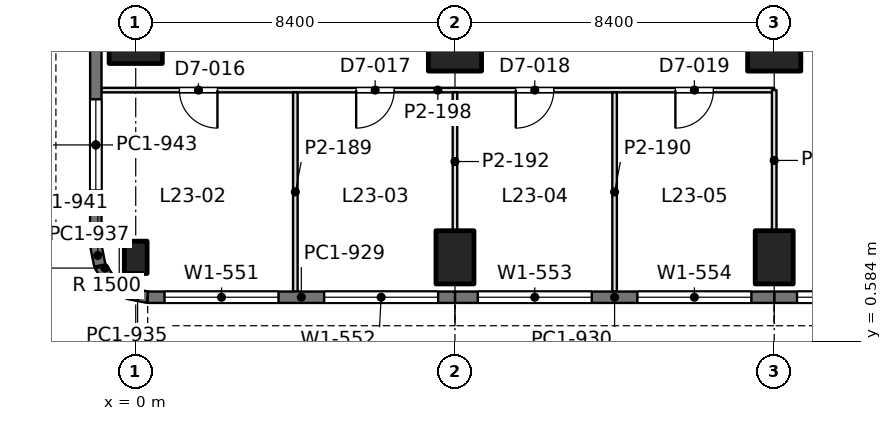
"""IFC4 building model, lengths in metres.
Left out: names, types, materials, properties, quantities, classifications, styles, units other than length and angle.
Written with IfcOpenShell. Run it as: python <this file> out.ifc"""

import sys

from ifc_helpers import new_model, si_unit, direction, frame, frame_2d, origin, origin_2d, place, context, subcontext, project, spatial, rectangle, extrude, element, fill, save


model = new_model("IFC4")
c1 = context("Model", 3, precision=1e-05, world=origin(), true_north=direction((0.0, 1.0)))
c2 = subcontext(c1, "Body", "Model", "MODEL_VIEW")
j1 = project(units=[si_unit("LENGTHUNIT", "METRE"), si_unit("PLANEANGLEUNIT", "RADIAN")], contexts=[c1])
p1 = place(None, origin())
s1 = spatial("IfcSite", under=j1, at=p1, CompositionType="ELEMENT")
p2 = place(p1, origin())
s2 = spatial("IfcBuilding", under=s1, at=p2, CompositionType="ELEMENT")
p3 = place(p2, frame((0.0, 0.0, 105.0)))
s3 = spatial("IfcBuildingStorey", under=s2, at=p3, CompositionType="ELEMENT", Elevation=105.0)
p4 = place(p3, frame((0.0, 2.8, 0.0), z_axis=(0.0, 0.0, 1.0), x_axis=(1.0, 0.0, 0.0)))
e1 = element("IfcColumn", 1, at=p4, inside=s3, PredefinedType="COLUMN", context=c2, shape_type="SweptSolid", body=[
    extrude(rectangle(XDim=0.6, YDim=0.85, at=origin_2d()), origin(), (0.0, 0.0, 1.0), 4.2),
])
for number, where, z_axis, x_axis in (
    (2, (0.0, 8.4, 0.0), (0.0, 0.0, 1.0), (0.0, 1.0, 0.0)),
    (3, (8.4, 2.8, 0.0), (0.0, 0.0, 1.0), (1.0, 0.0, 0.0)),
):
    element("IfcColumn", number, at=place(p3, frame(where, z_axis=z_axis, x_axis=x_axis)), inside=s3, PredefinedType="COLUMN", context=c2, shape_type="SweptSolid", body=[
        extrude(rectangle(XDim=1.0, YDim=1.4, at=origin_2d()), origin(), (0.0, 0.0, 1.0), 4.2),
    ])
p5 = place(p3, frame((8.4, 8.4, 0.0), z_axis=(0.0, 0.0, 1.0), x_axis=(1.0, 0.0, 0.0)))
e4 = element("IfcColumn", 4, at=p5, inside=s3, PredefinedType="COLUMN", context=c2, shape_type="SweptSolid", body=[
    extrude(rectangle(XDim=1.4, YDim=1.4, at=origin_2d()), origin(), (0.0, 0.0, 1.0), 4.2),
])
p6 = place(p3, frame((16.8, 2.8, 0.0), z_axis=(0.0, 0.0, 1.0), x_axis=(1.0, 0.0, 0.0)))
e5 = element("IfcColumn", 5, at=p6, inside=s3, PredefinedType="COLUMN", context=c2, shape_type="SweptSolid", body=[
    extrude(rectangle(XDim=1.0, YDim=1.4, at=origin_2d()), origin(), (0.0, 0.0, 1.0), 4.2),
])
p7 = place(p3, frame((16.8, 8.4, 0.0), z_axis=(0.0, 0.0, 1.0), x_axis=(1.0, 0.0, 0.0)))
e6 = element("IfcColumn", 6, at=p7, inside=s3, PredefinedType="COLUMN", context=c2, shape_type="SweptSolid", body=[
    extrude(rectangle(XDim=1.4, YDim=1.4, at=origin_2d()), origin(), (0.0, 0.0, 1.0), 4.2),
])
p8 = place(p3, frame((25.2, 1.75, 0.0), z_axis=(0.0, 0.0, 1.0), x_axis=(-1.0, 0.0, 0.0)))
e7 = element("IfcWall", 7, at=p8, inside=s3, PredefinedType="SOLIDWALL", context=c2, shape_type="SweptSolid", body=[
    extrude(rectangle(XDim=8.4, YDim=0.3, at=frame_2d((4.2, 0.0))), origin(), (0.0, 0.0, 1.0), 4.05),
])
p9 = place(p8, frame((0.6, 0.0, 0.9)))
e8 = element("IfcOpeningElement", 8, at=p9, cuts=e7, PredefinedType="OPENING", context=c2, shape_type="SweptSolid", body=[
    extrude(rectangle(XDim=3.0, YDim=1.9, at=frame_2d((1.5, 0.95))), frame((0.0, 0.16, 0.0), z_axis=(0.0, -1.0, 0.0), x_axis=(1.0, 0.0, 0.0)), (0.0, 0.0, 1.0), 0.32),
])
p10 = place(p8, frame((4.8, 0.0, 0.9)))
e9 = element("IfcOpeningElement", 9, at=p10, cuts=e7, PredefinedType="OPENING", context=c2, shape_type="SweptSolid", body=[
    extrude(rectangle(XDim=3.0, YDim=1.9, at=frame_2d((1.5, 0.95))), frame((0.0, 0.16, 0.0), z_axis=(0.0, -1.0, 0.0), x_axis=(1.0, 0.0, 0.0)), (0.0, 0.0, 1.0), 0.32),
])
p11 = place(p3, frame((16.8, 1.75, 0.0), z_axis=(0.0, 0.0, 1.0), x_axis=(-1.0, 0.0, 0.0)))
e10 = element("IfcWall", 10, at=p11, inside=s3, PredefinedType="SOLIDWALL", context=c2, shape_type="SweptSolid", body=[
    extrude(rectangle(XDim=8.4, YDim=0.3, at=frame_2d((4.2, 0.0))), origin(), (0.0, 0.0, 1.0), 4.05),
])
p12 = place(p11, frame((0.6, 0.0, 0.9)))
e11 = element("IfcOpeningElement", 11, at=p12, cuts=e10, PredefinedType="OPENING", context=c2, shape_type="SweptSolid", body=[
    extrude(rectangle(XDim=3.0, YDim=1.9, at=frame_2d((1.5, 0.95))), frame((0.0, 0.16, 0.0), z_axis=(0.0, -1.0, 0.0), x_axis=(1.0, 0.0, 0.0)), (0.0, 0.0, 1.0), 0.32),
])
p13 = place(p11, frame((4.8, 0.0, 0.9)))
e12 = element("IfcOpeningElement", 12, at=p13, cuts=e10, PredefinedType="OPENING", context=c2, shape_type="SweptSolid", body=[
    extrude(rectangle(XDim=3.0, YDim=1.9, at=frame_2d((1.5, 0.95))), frame((0.0, 0.16, 0.0), z_axis=(0.0, -1.0, 0.0), x_axis=(1.0, 0.0, 0.0)), (0.0, 0.0, 1.0), 0.32),
])
p14 = place(p3, frame((8.4, 1.75, 0.0), z_axis=(0.0, 0.0, 1.0), x_axis=(-1.0, 0.0, 0.0)))
e13 = element("IfcWall", 13, at=p14, inside=s3, PredefinedType="SOLIDWALL", context=c2, shape_type="SweptSolid", body=[
    extrude(rectangle(XDim=8.085, YDim=0.3, at=frame_2d((4.042, 0.0))), origin(), (0.0, 0.0, 1.0), 4.05),
])
p15 = place(p14, frame((0.443, 0.0, 0.9)))
e14 = element("IfcOpeningElement", 14, at=p15, cuts=e13, PredefinedType="OPENING", context=c2, shape_type="SweptSolid", body=[
    extrude(rectangle(XDim=3.0, YDim=1.9, at=frame_2d((1.5, 0.95))), frame((0.0, 0.16, 0.0), z_axis=(0.0, -1.0, 0.0), x_axis=(1.0, 0.0, 0.0)), (0.0, 0.0, 1.0), 0.32),
])
p16 = place(p14, frame((4.643, 0.0, 0.9)))
e15 = element("IfcOpeningElement", 15, at=p16, cuts=e13, PredefinedType="OPENING", context=c2, shape_type="SweptSolid", body=[
    extrude(rectangle(XDim=3.0, YDim=1.9, at=frame_2d((1.5, 0.95))), frame((0.0, 0.16, 0.0), z_axis=(0.0, -1.0, 0.0), x_axis=(1.0, 0.0, 0.0)), (0.0, 0.0, 1.0), 0.32),
])
p17 = place(p3, frame((0.315, 1.75, 0.0), z_axis=(0.0, 0.0, 1.0), x_axis=(-0.980788534345, 0.195073962632, 0.0)))
e16 = element("IfcWall", 16, at=p17, inside=s3, PredefinedType="SOLIDWALL", context=c2, shape_type="SweptSolid", body=[
    extrude(rectangle(XDim=0.541, YDim=0.3, at=frame_2d((0.271, 0.0))), origin(), (0.0, 0.0, 1.0), 4.05),
])
for number, where, z_axis, x_axis in (
    (17, (-0.216, 1.855, 0.0), (0.0, 0.0, 1.0), (-0.831, 0.556, 0.0)),
    (18, (-0.653, 2.147, 0.0), (0.0, 0.0, 1.0), (-0.556, 0.831, 0.0)),
):
    element("IfcWall", number, at=place(p3, frame(where, z_axis=z_axis, x_axis=x_axis)), inside=s3, PredefinedType="SOLIDWALL", context=c2, shape_type="SweptSolid", body=[
        extrude(rectangle(XDim=0.526, YDim=0.3, at=frame_2d((0.263, 0.0))), origin(), (0.0, 0.0, 1.0), 4.05),
    ])
p18 = place(p3, frame((-0.945, 2.584, 0.0), z_axis=(0.0, 0.0, 1.0), x_axis=(-0.195073962632, 0.980788534345, 0.0)))
e19 = element("IfcWall", 19, at=p18, inside=s3, PredefinedType="SOLIDWALL", context=c2, shape_type="SweptSolid", body=[
    extrude(rectangle(XDim=0.541, YDim=0.3, at=frame_2d((0.271, 0.0))), origin(), (0.0, 0.0, 1.0), 4.05),
])
p19 = place(p3, frame((-1.05, 3.115, 0.0), z_axis=(0.0, 0.0, 1.0), x_axis=(0.0, 1.0, 0.0)))
e20 = element("IfcWall", 20, at=p19, inside=s3, PredefinedType="SOLIDWALL", context=c2, shape_type="SweptSolid", body=[
    extrude(rectangle(XDim=5.285, YDim=0.3, at=frame_2d((2.643, 0.0))), origin(), (0.0, 0.0, 1.0), 4.05),
])
p20 = place(p19, frame((1.443, 0.0, 0.9)))
e21 = element("IfcOpeningElement", 21, at=p20, cuts=e20, PredefinedType="OPENING", context=c2, shape_type="SweptSolid", body=[
    extrude(rectangle(XDim=2.4, YDim=1.9, at=frame_2d((1.2, 0.95))), frame((0.0, 0.16, 0.0), z_axis=(0.0, -1.0, 0.0), x_axis=(1.0, 0.0, 0.0)), (0.0, 0.0, 1.0), 0.32),
])
p21 = place(p3, frame((-0.902, 7.2, 0.0), z_axis=(0.0, 0.0, 1.0), x_axis=(1.0, 0.0, 0.0)))
e22 = element("IfcWall", 22, at=p21, inside=s3, PredefinedType="PARTITIONING", context=c2, shape_type="SweptSolid", body=[
    extrude(rectangle(XDim=17.702, YDim=0.12, at=frame_2d((8.851, 0.0))), origin(), (0.0, 0.0, 1.0), 3.55),
])
p22 = place(p21, frame((2.052, 0.0, 0.0)))
e23 = element("IfcOpeningElement", 23, at=p22, cuts=e22, PredefinedType="OPENING", context=c2, shape_type="SweptSolid", body=[
    extrude(rectangle(XDim=1.0, YDim=2.4, at=frame_2d((0.5, 1.2))), frame((0.0, 0.07, 0.0), z_axis=(0.0, -1.0, 0.0), x_axis=(1.0, 0.0, 0.0)), (0.0, 0.0, 1.0), 0.14),
])
p23 = place(p21, frame((6.702, 0.0, 0.0)))
e24 = element("IfcOpeningElement", 24, at=p23, cuts=e22, PredefinedType="OPENING", context=c2, shape_type="SweptSolid", body=[
    extrude(rectangle(XDim=1.0, YDim=2.4, at=frame_2d((0.5, 1.2))), frame((0.0, 0.07, 0.0), z_axis=(0.0, -1.0, 0.0), x_axis=(1.0, 0.0, 0.0)), (0.0, 0.0, 1.0), 0.14),
])
p24 = place(p21, frame((10.902, 0.0, 0.0)))
e25 = element("IfcOpeningElement", 25, at=p24, cuts=e22, PredefinedType="OPENING", context=c2, shape_type="SweptSolid", body=[
    extrude(rectangle(XDim=1.0, YDim=2.4, at=frame_2d((0.5, 1.2))), frame((0.0, 0.07, 0.0), z_axis=(0.0, -1.0, 0.0), x_axis=(1.0, 0.0, 0.0)), (0.0, 0.0, 1.0), 0.14),
])
p25 = place(p21, frame((15.102, 0.0, 0.0)))
e26 = element("IfcOpeningElement", 26, at=p25, cuts=e22, PredefinedType="OPENING", context=c2, shape_type="SweptSolid", body=[
    extrude(rectangle(XDim=1.0, YDim=2.4, at=frame_2d((0.5, 1.2))), frame((0.0, 0.07, 0.0), z_axis=(0.0, -1.0, 0.0), x_axis=(1.0, 0.0, 0.0)), (0.0, 0.0, 1.0), 0.14),
])
p26 = place(p3, frame((4.2, 1.898, 0.0), z_axis=(0.0, 0.0, 1.0), x_axis=(0.0, 1.0, 0.0)))
e27 = element("IfcWall", 27, at=p26, inside=s3, PredefinedType="PARTITIONING", context=c2, shape_type="SweptSolid", body=[
    extrude(rectangle(XDim=5.244, YDim=0.12, at=frame_2d((2.622, 0.0))), origin(), (0.0, 0.0, 1.0), 3.56),
])
p27 = place(p3, frame((8.4, 3.499, 0.0), z_axis=(0.0, 0.0, 1.0), x_axis=(0.0, 1.0, 0.0)))
e28 = element("IfcWall", 28, at=p27, inside=s3, PredefinedType="PARTITIONING", context=c2, shape_type="SweptSolid", body=[
    extrude(rectangle(XDim=3.643, YDim=0.12, at=frame_2d((1.822, 0.0))), origin(), (0.0, 0.0, 1.0), 3.55),
])
p28 = place(p3, frame((12.6, 1.898, 0.0), z_axis=(0.0, 0.0, 1.0), x_axis=(0.0, 1.0, 0.0)))
e29 = element("IfcWall", 29, at=p28, inside=s3, PredefinedType="PARTITIONING", context=c2, shape_type="SweptSolid", body=[
    extrude(rectangle(XDim=5.244, YDim=0.12, at=frame_2d((2.622, 0.0))), origin(), (0.0, 0.0, 1.0), 3.56),
])
p29 = place(p3, frame((16.8, 3.499, 0.0), z_axis=(0.0, 0.0, 1.0), x_axis=(0.0, 1.0, 0.0)))
e30 = element("IfcWall", 30, at=p29, inside=s3, PredefinedType="PARTITIONING", context=c2, shape_type="SweptSolid", body=[
    extrude(rectangle(XDim=3.701, YDim=0.12, at=frame_2d((1.851, 0.0))), origin(), (0.0, 0.0, 1.0), 3.55),
])
p30 = place(p10, origin())
e31 = element("IfcWindow", 31, at=p30, inside=s3, PartitioningType="SINGLE_PANEL", PredefinedType="WINDOW", context=c2, shape_type="SweptSolid", body=[
    extrude(rectangle(XDim=3.0, YDim=1.9, at=frame_2d((1.5, 0.95))), frame((0.0, 0.03, 0.0), z_axis=(0.0, -1.0, 0.0), x_axis=(1.0, 0.0, 0.0)), (0.0, 0.0, 1.0), 0.06),
])
fill(e9, e31)
p31 = place(p12, origin())
e32 = element("IfcWindow", 32, at=p31, inside=s3, PartitioningType="SINGLE_PANEL", PredefinedType="WINDOW", context=c2, shape_type="SweptSolid", body=[
    extrude(rectangle(XDim=3.0, YDim=1.9, at=frame_2d((1.5, 0.95))), frame((0.0, 0.03, 0.0), z_axis=(0.0, -1.0, 0.0), x_axis=(1.0, 0.0, 0.0)), (0.0, 0.0, 1.0), 0.06),
])
fill(e11, e32)
p32 = place(p13, origin())
e33 = element("IfcWindow", 33, at=p32, inside=s3, PartitioningType="SINGLE_PANEL", PredefinedType="WINDOW", context=c2, shape_type="SweptSolid", body=[
    extrude(rectangle(XDim=3.0, YDim=1.9, at=frame_2d((1.5, 0.95))), frame((0.0, 0.03, 0.0), z_axis=(0.0, -1.0, 0.0), x_axis=(1.0, 0.0, 0.0)), (0.0, 0.0, 1.0), 0.06),
])
fill(e12, e33)
p33 = place(p15, origin())
e34 = element("IfcWindow", 34, at=p33, inside=s3, PartitioningType="SINGLE_PANEL", PredefinedType="WINDOW", context=c2, shape_type="SweptSolid", body=[
    extrude(rectangle(XDim=3.0, YDim=1.9, at=frame_2d((1.5, 0.95))), frame((0.0, 0.03, 0.0), z_axis=(0.0, -1.0, 0.0), x_axis=(1.0, 0.0, 0.0)), (0.0, 0.0, 1.0), 0.06),
])
fill(e14, e34)
p34 = place(p16, origin())
e35 = element("IfcWindow", 35, at=p34, inside=s3, PartitioningType="SINGLE_PANEL", PredefinedType="WINDOW", context=c2, shape_type="SweptSolid", body=[
    extrude(rectangle(XDim=3.0, YDim=1.9, at=frame_2d((1.5, 0.95))), frame((0.0, 0.03, 0.0), z_axis=(0.0, -1.0, 0.0), x_axis=(1.0, 0.0, 0.0)), (0.0, 0.0, 1.0), 0.06),
])
fill(e15, e35)
p35 = place(p20, origin())
e36 = element("IfcWindow", 36, at=p35, inside=s3, PartitioningType="SINGLE_PANEL", PredefinedType="WINDOW", context=c2, shape_type="SweptSolid", body=[
    extrude(rectangle(XDim=2.4, YDim=1.9, at=frame_2d((1.2, 0.95))), frame((0.0, 0.03, 0.0), z_axis=(0.0, -1.0, 0.0), x_axis=(1.0, 0.0, 0.0)), (0.0, 0.0, 1.0), 0.06),
])
fill(e21, e36)
p36 = place(p22, frame((1.0, 0.0, 0.0), z_axis=(0.0, 0.0, 1.0), x_axis=(-1.0, 0.0, 0.0)))
e37 = element("IfcDoor", 37, at=p36, inside=s3, OperationType="SINGLE_SWING_LEFT", PredefinedType="DOOR", context=c2, shape_type="SweptSolid", body=[
    extrude(rectangle(XDim=1.0, YDim=2.4, at=frame_2d((0.5, 1.2))), frame((0.0, 0.025, 0.0), z_axis=(0.0, -1.0, 0.0), x_axis=(1.0, 0.0, 0.0)), (0.0, 0.0, 1.0), 0.05),
])
fill(e23, e37)
p37 = place(p23, frame((1.0, 0.0, 0.0), z_axis=(0.0, 0.0, 1.0), x_axis=(-1.0, 0.0, 0.0)))
e38 = element("IfcDoor", 38, at=p37, inside=s3, OperationType="SINGLE_SWING_RIGHT", PredefinedType="DOOR", context=c2, shape_type="SweptSolid", body=[
    extrude(rectangle(XDim=1.0, YDim=2.4, at=frame_2d((0.5, 1.2))), frame((0.0, 0.025, 0.0), z_axis=(0.0, -1.0, 0.0), x_axis=(1.0, 0.0, 0.0)), (0.0, 0.0, 1.0), 0.05),
])
fill(e24, e38)
p38 = place(p24, frame((1.0, 0.0, 0.0), z_axis=(0.0, 0.0, 1.0), x_axis=(-1.0, 0.0, 0.0)))
e39 = element("IfcDoor", 39, at=p38, inside=s3, OperationType="SINGLE_SWING_RIGHT", PredefinedType="DOOR", context=c2, shape_type="SweptSolid", body=[
    extrude(rectangle(XDim=1.0, YDim=2.4, at=frame_2d((0.5, 1.2))), frame((0.0, 0.025, 0.0), z_axis=(0.0, -1.0, 0.0), x_axis=(1.0, 0.0, 0.0)), (0.0, 0.0, 1.0), 0.05),
])
fill(e25, e39)
p39 = place(p25, frame((1.0, 0.0, 0.0), z_axis=(0.0, 0.0, 1.0), x_axis=(-1.0, 0.0, 0.0)))
e40 = element("IfcDoor", 40, at=p39, inside=s3, OperationType="SINGLE_SWING_RIGHT", PredefinedType="DOOR", context=c2, shape_type="SweptSolid", body=[
    extrude(rectangle(XDim=1.0, YDim=2.4, at=frame_2d((0.5, 1.2))), frame((0.0, 0.025, 0.0), z_axis=(0.0, -1.0, 0.0), x_axis=(1.0, 0.0, 0.0)), (0.0, 0.0, 1.0), 0.05),
])
fill(e26, e40)
save(model, sys.argv[1])
